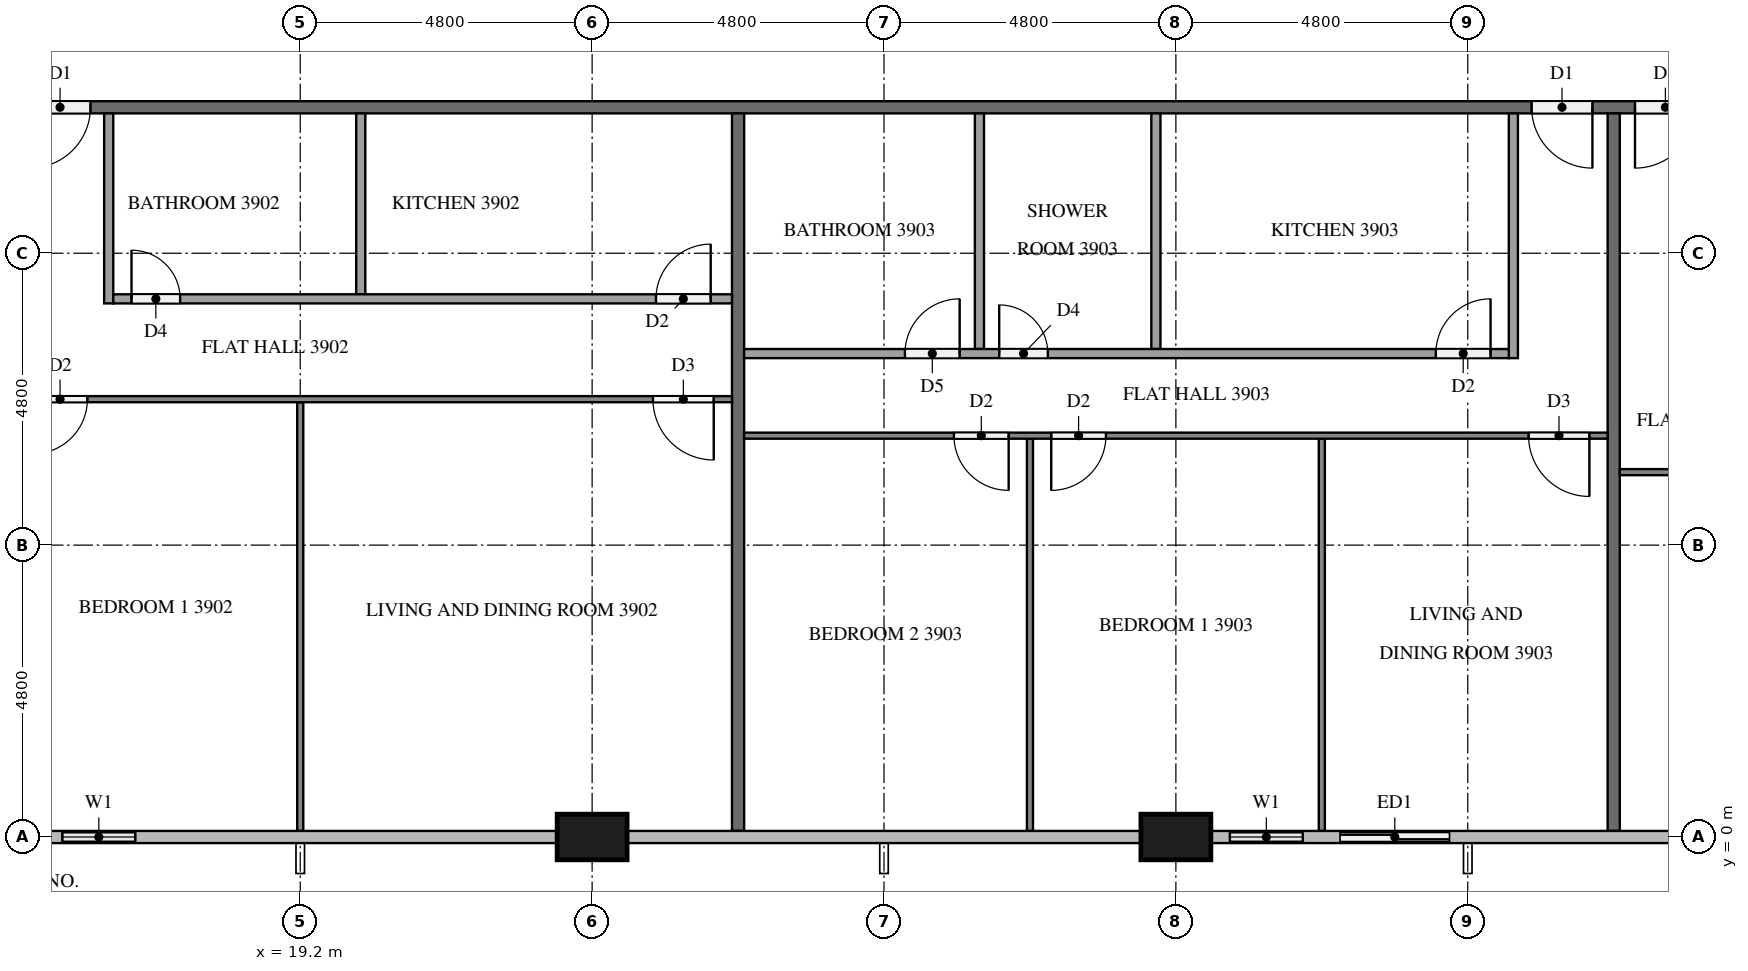
"""IFC4 building model, lengths in metres.
Left out: names, types, materials, properties, quantities, classifications, styles, units other than length and angle.
Written with IfcOpenShell. Run it as: python <this file> out.ifc"""

import sys

from ifc_helpers import new_model, si_unit, direction, frame, frame_2d, origin, origin_2d, place, context, subcontext, project, spatial, rectangle, extrude, element, fill, save


model = new_model("IFC4")
c1 = context("Model", 3, precision=1e-05, world=origin(), true_north=direction((0.0, 1.0)))
c2 = subcontext(c1, "Body", "Model", "MODEL_VIEW")
j1 = project(units=[si_unit("LENGTHUNIT", "METRE"), si_unit("PLANEANGLEUNIT", "RADIAN")], contexts=[c1])
p1 = place(None, origin())
s1 = spatial("IfcSite", under=j1, at=p1, CompositionType="ELEMENT")
p2 = place(p1, origin())
s2 = spatial("IfcBuilding", under=s1, at=p2, CompositionType="ELEMENT")
p3 = place(p2, frame((0.0, 0.0, 152.5)))
s3 = spatial("IfcBuildingStorey", under=s2, at=p3, CompositionType="ELEMENT", Elevation=152.5)
for number, where, z_axis, x_axis in (
    (1, (24.0, 0.0, 0.0), (0.0, 0.0, 1.0), (1.0, 0.0, 0.0)),
    (2, (33.6, 0.0, 0.0), (0.0, 0.0, 1.0), (1.0, 0.0, 0.0)),
):
    element("IfcColumn", number, at=place(p3, frame(where, z_axis=z_axis, x_axis=x_axis)), inside=s3, PredefinedType="COLUMN", context=c2, shape_type="SweptSolid", body=[
        extrude(rectangle(XDim=1.15, YDim=0.75, at=origin_2d()), origin(), (0.0, 0.0, 1.0), 3.2),
    ])
p4 = place(p3, frame((14.975, 0.0, 0.0), z_axis=(0.0, 0.0, 1.0), x_axis=(1.0, 0.0, 0.0)))
e3 = element("IfcWall", 3, at=p4, inside=s3, PredefinedType="SOLIDWALL", context=c2, shape_type="SweptSolid", body=[
    extrude(rectangle(XDim=1.825, YDim=0.15, at=frame_2d((0.913, 0.0))), origin(), (0.0, 0.0, 1.0), 3.2),
])
p5 = place(p4, frame((0.312, 0.0, 0.9)))
e4 = element("IfcOpeningElement", 4, at=p5, cuts=e3, PredefinedType="OPENING", context=c2, shape_type="SweptSolid", body=[
    extrude(rectangle(XDim=1.2, YDim=1.4, at=frame_2d((0.6, 0.7))), frame((0.0, 0.085, 0.0), z_axis=(0.0, -1.0, 0.0), x_axis=(1.0, 0.0, 0.0)), (0.0, 0.0, 1.0), 0.17),
])
p6 = place(p3, frame((34.175, 0.0, 0.0), z_axis=(0.0, 0.0, 1.0), x_axis=(1.0, 0.0, 0.0)))
e5 = element("IfcWall", 5, at=p6, inside=s3, PredefinedType="SOLIDWALL", context=c2, shape_type="SweptSolid", body=[
    extrude(rectangle(XDim=4.225, YDim=0.15, at=frame_2d((2.112, 0.0))), origin(), (0.0, 0.0, 1.0), 3.2),
])
p7 = place(p6, frame((0.312, 0.0, 0.9)))
e6 = element("IfcOpeningElement", 6, at=p7, cuts=e5, PredefinedType="OPENING", context=c2, shape_type="SweptSolid", body=[
    extrude(rectangle(XDim=1.2, YDim=1.4, at=frame_2d((0.6, 0.7))), frame((0.0, 0.085, 0.0), z_axis=(0.0, -1.0, 0.0), x_axis=(1.0, 0.0, 0.0)), (0.0, 0.0, 1.0), 0.17),
])
p8 = place(p6, frame((2.125, 0.0, 0.0)))
e7 = element("IfcOpeningElement", 7, at=p8, cuts=e5, PredefinedType="OPENING", context=c2, shape_type="SweptSolid", body=[
    extrude(rectangle(XDim=1.8, YDim=2.4, at=frame_2d((0.9, 1.2))), frame((0.0, 0.085, 0.0), z_axis=(0.0, -1.0, 0.0), x_axis=(1.0, 0.0, 0.0)), (0.0, 0.0, 1.0), 0.17),
])
p9 = place(p3, frame((50.5, 12.0, 0.0), z_axis=(0.0, 0.0, 1.0), x_axis=(-1.0, 0.0, 0.0)))
e8 = element("IfcWall", 8, at=p9, inside=s3, PredefinedType="PARTITIONING", context=c2, shape_type="SweptSolid", body=[
    extrude(rectangle(XDim=38.6, YDim=0.2, at=frame_2d((19.3, 0.0))), origin(), (0.0, 0.0, 1.0), 3.2),
])
p10 = place(p9, frame((36.45, 0.0, 0.0)))
e9 = element("IfcOpeningElement", 9, at=p10, cuts=e8, PredefinedType="OPENING", context=c2, shape_type="SweptSolid", body=[
    extrude(rectangle(XDim=1.0, YDim=2.1, at=frame_2d((0.5, 1.05))), frame((0.0, 0.11, 0.0), z_axis=(0.0, -1.0, 0.0), x_axis=(1.0, 0.0, 0.0)), (0.0, 0.0, 1.0), 0.22),
])
p11 = place(p9, frame((34.75, 0.0, 0.0)))
e10 = element("IfcOpeningElement", 10, at=p11, cuts=e8, PredefinedType="OPENING", context=c2, shape_type="SweptSolid", body=[
    extrude(rectangle(XDim=1.0, YDim=2.1, at=frame_2d((0.5, 1.05))), frame((0.0, 0.11, 0.0), z_axis=(0.0, -1.0, 0.0), x_axis=(1.0, 0.0, 0.0)), (0.0, 0.0, 1.0), 0.22),
])
p12 = place(p9, frame((10.05, 0.0, 0.0)))
e11 = element("IfcOpeningElement", 11, at=p12, cuts=e8, PredefinedType="OPENING", context=c2, shape_type="SweptSolid", body=[
    extrude(rectangle(XDim=1.0, YDim=2.1, at=frame_2d((0.5, 1.05))), frame((0.0, 0.11, 0.0), z_axis=(0.0, -1.0, 0.0), x_axis=(1.0, 0.0, 0.0)), (0.0, 0.0, 1.0), 0.22),
])
p13 = place(p9, frame((8.35, 0.0, 0.0)))
e12 = element("IfcOpeningElement", 12, at=p13, cuts=e8, PredefinedType="OPENING", context=c2, shape_type="SweptSolid", body=[
    extrude(rectangle(XDim=1.0, YDim=2.1, at=frame_2d((0.5, 1.05))), frame((0.0, 0.11, 0.0), z_axis=(0.0, -1.0, 0.0), x_axis=(1.0, 0.0, 0.0)), (0.0, 0.0, 1.0), 0.22),
])
for number, where, z_axis, x_axis in (
    (13, (26.4, 11.9, 0.0), (0.0, 0.0, 1.0), (0.0, -1.0, 0.0)),
    (14, (40.8, 11.9, 0.0), (0.0, 0.0, 1.0), (0.0, -1.0, 0.0)),
):
    element("IfcWall", number, at=place(p3, frame(where, z_axis=z_axis, x_axis=x_axis)), inside=s3, PredefinedType="PARTITIONING", context=c2, shape_type="SweptSolid", body=[
        extrude(rectangle(XDim=11.8, YDim=0.2, at=frame_2d((5.9, 0.0))), origin(), (0.0, 0.0, 1.0), 3.2),
    ])
p14 = place(p3, frame((19.2, 7.15, 0.0), z_axis=(0.0, 0.0, 1.0), x_axis=(0.0, -1.0, 0.0)))
e15 = element("IfcWall", 15, at=p14, inside=s3, PredefinedType="PARTITIONING", context=c2, shape_type="SweptSolid", body=[
    extrude(rectangle(XDim=7.05, YDim=0.1, at=frame_2d((3.525, 0.0))), origin(), (0.0, 0.0, 1.0), 3.2),
])
p15 = place(p3, frame((26.3, 7.2, 0.0), z_axis=(0.0, 0.0, 1.0), x_axis=(-1.0, 0.0, 0.0)))
e16 = element("IfcWall", 16, at=p15, inside=s3, PredefinedType="PARTITIONING", context=c2, shape_type="SweptSolid", body=[
    extrude(rectangle(XDim=11.8, YDim=0.1, at=frame_2d((5.9, 0.0))), origin(), (0.0, 0.0, 1.0), 3.2),
])
p16 = place(p15, frame((10.6, 0.0, 0.0)))
e17 = element("IfcOpeningElement", 17, at=p16, cuts=e16, PredefinedType="OPENING", context=c2, shape_type="SweptSolid", body=[
    extrude(rectangle(XDim=0.9, YDim=2.1, at=frame_2d((0.45, 1.05))), frame((0.0, 0.06, 0.0), z_axis=(0.0, -1.0, 0.0), x_axis=(1.0, 0.0, 0.0)), (0.0, 0.0, 1.0), 0.12),
])
p17 = place(p15, frame((0.3, 0.0, 0.0)))
e18 = element("IfcOpeningElement", 18, at=p17, cuts=e16, PredefinedType="OPENING", context=c2, shape_type="SweptSolid", body=[
    extrude(rectangle(XDim=1.0, YDim=2.1, at=frame_2d((0.5, 1.05))), frame((0.0, 0.06, 0.0), z_axis=(0.0, -1.0, 0.0), x_axis=(1.0, 0.0, 0.0)), (0.0, 0.0, 1.0), 0.12),
])
p18 = place(p3, frame((20.195, 11.9, 0.0), z_axis=(0.0, 0.0, 1.0), x_axis=(0.0, -1.0, 0.0)))
e19 = element("IfcWall", 19, at=p18, inside=s3, PredefinedType="PARTITIONING", context=c2, shape_type="SweptSolid", body=[
    extrude(rectangle(XDim=2.975, YDim=0.15, at=frame_2d((1.487, 0.0))), origin(), (0.0, 0.0, 1.0), 3.2),
])
p19 = place(p3, frame((16.05, 11.9, 0.0), z_axis=(0.0, 0.0, 1.0), x_axis=(0.0, -1.0, 0.0)))
e20 = element("IfcWall", 20, at=p19, inside=s3, PredefinedType="PARTITIONING", context=c2, shape_type="SweptSolid", body=[
    extrude(rectangle(XDim=3.125, YDim=0.15, at=frame_2d((1.562, 0.0))), origin(), (0.0, 0.0, 1.0), 3.2),
])
p20 = place(p3, frame((16.125, 8.85, 0.0), z_axis=(0.0, 0.0, 1.0), x_axis=(1.0, 0.0, 0.0)))
e21 = element("IfcWall", 21, at=p20, inside=s3, PredefinedType="PARTITIONING", context=c2, shape_type="SweptSolid", body=[
    extrude(rectangle(XDim=10.175, YDim=0.15, at=frame_2d((5.087, 0.0))), origin(), (0.0, 0.0, 1.0), 3.2),
])
p21 = place(p20, frame((0.3, 0.0, 0.0)))
e22 = element("IfcOpeningElement", 22, at=p21, cuts=e21, PredefinedType="OPENING", context=c2, shape_type="SweptSolid", body=[
    extrude(rectangle(XDim=0.8, YDim=2.1, at=frame_2d((0.4, 1.05))), frame((0.0, 0.085, 0.0), z_axis=(0.0, -1.0, 0.0), x_axis=(1.0, 0.0, 0.0)), (0.0, 0.0, 1.0), 0.17),
])
p22 = place(p20, frame((8.925, 0.0, 0.0)))
e23 = element("IfcOpeningElement", 23, at=p22, cuts=e21, PredefinedType="OPENING", context=c2, shape_type="SweptSolid", body=[
    extrude(rectangle(XDim=0.9, YDim=2.1, at=frame_2d((0.45, 1.05))), frame((0.0, 0.085, 0.0), z_axis=(0.0, -1.0, 0.0), x_axis=(1.0, 0.0, 0.0)), (0.0, 0.0, 1.0), 0.17),
])
for number, where, z_axis, x_axis in (
    (24, (36.0, 6.55, 0.0), (0.0, 0.0, 1.0), (0.0, -1.0, 0.0)),
    (25, (31.2, 6.55, 0.0), (0.0, 0.0, 1.0), (0.0, -1.0, 0.0)),
):
    element("IfcWall", number, at=place(p3, frame(where, z_axis=z_axis, x_axis=x_axis)), inside=s3, PredefinedType="PARTITIONING", context=c2, shape_type="SweptSolid", body=[
        extrude(rectangle(XDim=6.45, YDim=0.1, at=frame_2d((3.225, 0.0))), origin(), (0.0, 0.0, 1.0), 3.2),
    ])
p23 = place(p3, frame((40.7, 6.6, 0.0), z_axis=(0.0, 0.0, 1.0), x_axis=(-1.0, 0.0, 0.0)))
e26 = element("IfcWall", 26, at=p23, inside=s3, PredefinedType="PARTITIONING", context=c2, shape_type="SweptSolid", body=[
    extrude(rectangle(XDim=14.2, YDim=0.1, at=frame_2d((7.1, 0.0))), origin(), (0.0, 0.0, 1.0), 3.2),
])
p24 = place(p23, frame((0.3, 0.0, 0.0)))
e27 = element("IfcOpeningElement", 27, at=p24, cuts=e26, PredefinedType="OPENING", context=c2, shape_type="SweptSolid", body=[
    extrude(rectangle(XDim=1.0, YDim=2.1, at=frame_2d((0.5, 1.05))), frame((0.0, 0.06, 0.0), z_axis=(0.0, -1.0, 0.0), x_axis=(1.0, 0.0, 0.0)), (0.0, 0.0, 1.0), 0.12),
])
p25 = place(p23, frame((8.25, 0.0, 0.0)))
e28 = element("IfcOpeningElement", 28, at=p25, cuts=e26, PredefinedType="OPENING", context=c2, shape_type="SweptSolid", body=[
    extrude(rectangle(XDim=0.9, YDim=2.1, at=frame_2d((0.45, 1.05))), frame((0.0, 0.06, 0.0), z_axis=(0.0, -1.0, 0.0), x_axis=(1.0, 0.0, 0.0)), (0.0, 0.0, 1.0), 0.12),
])
p26 = place(p23, frame((9.85, 0.0, 0.0)))
e29 = element("IfcOpeningElement", 29, at=p26, cuts=e26, PredefinedType="OPENING", context=c2, shape_type="SweptSolid", body=[
    extrude(rectangle(XDim=0.9, YDim=2.1, at=frame_2d((0.45, 1.05))), frame((0.0, 0.06, 0.0), z_axis=(0.0, -1.0, 0.0), x_axis=(1.0, 0.0, 0.0)), (0.0, 0.0, 1.0), 0.12),
])
for number, where, z_axis, x_axis in (
    (30, (33.271, 11.9, 0.0), (0.0, 0.0, 1.0), (0.0, -1.0, 0.0)),
    (31, (30.369, 11.9, 0.0), (0.0, 0.0, 1.0), (0.0, -1.0, 0.0)),
):
    element("IfcWall", number, at=place(p3, frame(where, z_axis=z_axis, x_axis=x_axis)), inside=s3, PredefinedType="PARTITIONING", context=c2, shape_type="SweptSolid", body=[
        extrude(rectangle(XDim=3.875, YDim=0.15, at=frame_2d((1.938, 0.0))), origin(), (0.0, 0.0, 1.0), 3.2),
    ])
p27 = place(p3, frame((39.15, 11.9, 0.0), z_axis=(0.0, 0.0, 1.0), x_axis=(0.0, -1.0, 0.0)))
e32 = element("IfcWall", 32, at=p27, inside=s3, PredefinedType="PARTITIONING", context=c2, shape_type="SweptSolid", body=[
    extrude(rectangle(XDim=4.025, YDim=0.15, at=frame_2d((2.012, 0.0))), origin(), (0.0, 0.0, 1.0), 3.2),
])
p28 = place(p3, frame((26.5, 7.95, 0.0), z_axis=(0.0, 0.0, 1.0), x_axis=(1.0, 0.0, 0.0)))
e33 = element("IfcWall", 33, at=p28, inside=s3, PredefinedType="PARTITIONING", context=c2, shape_type="SweptSolid", body=[
    extrude(rectangle(XDim=12.575, YDim=0.15, at=frame_2d((6.288, 0.0))), origin(), (0.0, 0.0, 1.0), 3.2),
])
p29 = place(p28, frame((11.375, 0.0, 0.0)))
e34 = element("IfcOpeningElement", 34, at=p29, cuts=e33, PredefinedType="OPENING", context=c2, shape_type="SweptSolid", body=[
    extrude(rectangle(XDim=0.9, YDim=2.1, at=frame_2d((0.45, 1.05))), frame((0.0, 0.085, 0.0), z_axis=(0.0, -1.0, 0.0), x_axis=(1.0, 0.0, 0.0)), (0.0, 0.0, 1.0), 0.17),
])
p30 = place(p28, frame((4.194, 0.0, 0.0)))
e35 = element("IfcOpeningElement", 35, at=p30, cuts=e33, PredefinedType="OPENING", context=c2, shape_type="SweptSolid", body=[
    extrude(rectangle(XDim=0.8, YDim=2.1, at=frame_2d((0.4, 1.05))), frame((0.0, 0.085, 0.0), z_axis=(0.0, -1.0, 0.0), x_axis=(1.0, 0.0, 0.0)), (0.0, 0.0, 1.0), 0.17),
])
p31 = place(p28, frame((2.644, 0.0, 0.0)))
e36 = element("IfcOpeningElement", 36, at=p31, cuts=e33, PredefinedType="OPENING", context=c2, shape_type="SweptSolid", body=[
    extrude(rectangle(XDim=0.9, YDim=2.1, at=frame_2d((0.45, 1.05))), frame((0.0, 0.085, 0.0), z_axis=(0.0, -1.0, 0.0), x_axis=(1.0, 0.0, 0.0)), (0.0, 0.0, 1.0), 0.17),
])
p32 = place(p3, frame((57.5, 6.0, 0.0), z_axis=(0.0, 0.0, 1.0), x_axis=(-1.0, 0.0, 0.0)))
e37 = element("IfcWall", 37, at=p32, inside=s3, PredefinedType="PARTITIONING", context=c2, shape_type="SweptSolid", body=[
    extrude(rectangle(XDim=16.6, YDim=0.1, at=frame_2d((8.3, 0.0))), origin(), (0.0, 0.0, 1.0), 3.2),
])
p33 = place(p32, frame((9.85, 0.0, 0.0)))
e38 = element("IfcOpeningElement", 38, at=p33, cuts=e37, PredefinedType="OPENING", context=c2, shape_type="SweptSolid", body=[
    extrude(rectangle(XDim=1.0, YDim=2.1, at=frame_2d((0.5, 1.05))), frame((0.0, 0.06, 0.0), z_axis=(0.0, -1.0, 0.0), x_axis=(1.0, 0.0, 0.0)), (0.0, 0.0, 1.0), 0.12),
])
p34 = place(p32, frame((8.25, 0.0, 0.0)))
e39 = element("IfcOpeningElement", 39, at=p34, cuts=e37, PredefinedType="OPENING", context=c2, shape_type="SweptSolid", body=[
    extrude(rectangle(XDim=0.9, YDim=2.1, at=frame_2d((0.45, 1.05))), frame((0.0, 0.06, 0.0), z_axis=(0.0, -1.0, 0.0), x_axis=(1.0, 0.0, 0.0)), (0.0, 0.0, 1.0), 0.12),
])
p35 = place(p32, frame((0.5, 0.0, 0.0)))
e40 = element("IfcOpeningElement", 40, at=p35, cuts=e37, PredefinedType="OPENING", context=c2, shape_type="SweptSolid", body=[
    extrude(rectangle(XDim=0.9, YDim=2.1, at=frame_2d((0.45, 1.05))), frame((0.0, 0.06, 0.0), z_axis=(0.0, -1.0, 0.0), x_axis=(1.0, 0.0, 0.0)), (0.0, 0.0, 1.0), 0.12),
])
p36 = place(p5, origin())
e41 = element("IfcWindow", 41, at=p36, inside=s3, PartitioningType="SINGLE_PANEL", PredefinedType="WINDOW", context=c2, shape_type="SweptSolid", body=[
    extrude(rectangle(XDim=1.2, YDim=1.4, at=frame_2d((0.6, 0.7))), frame((0.0, 0.03, 0.0), z_axis=(0.0, -1.0, 0.0), x_axis=(1.0, 0.0, 0.0)), (0.0, 0.0, 1.0), 0.06),
])
fill(e4, e41)
p37 = place(p7, origin())
e42 = element("IfcWindow", 42, at=p37, inside=s3, PartitioningType="SINGLE_PANEL", PredefinedType="WINDOW", context=c2, shape_type="SweptSolid", body=[
    extrude(rectangle(XDim=1.2, YDim=1.4, at=frame_2d((0.6, 0.7))), frame((0.0, 0.03, 0.0), z_axis=(0.0, -1.0, 0.0), x_axis=(1.0, 0.0, 0.0)), (0.0, 0.0, 1.0), 0.06),
])
fill(e6, e42)
p38 = place(p8, origin())
e43 = element("IfcDoor", 43, at=p38, inside=s3, OperationType="SLIDING_TO_LEFT", PredefinedType="DOOR", context=c2, shape_type="SweptSolid", body=[
    extrude(rectangle(XDim=1.8, YDim=2.4, at=frame_2d((0.9, 1.2))), frame((0.0, 0.025, 0.0), z_axis=(0.0, -1.0, 0.0), x_axis=(1.0, 0.0, 0.0)), (0.0, 0.0, 1.0), 0.05),
])
fill(e7, e43)
p39 = place(p11, origin())
e44 = element("IfcDoor", 44, at=p39, inside=s3, OperationType="SINGLE_SWING_RIGHT", PredefinedType="DOOR", context=c2, shape_type="SweptSolid", body=[
    extrude(rectangle(XDim=1.0, YDim=2.1, at=frame_2d((0.5, 1.05))), frame((0.0, 0.025, 0.0), z_axis=(0.0, -1.0, 0.0), x_axis=(1.0, 0.0, 0.0)), (0.0, 0.0, 1.0), 0.05),
])
fill(e10, e44)
p40 = place(p12, origin())
e45 = element("IfcDoor", 45, at=p40, inside=s3, OperationType="SINGLE_SWING_LEFT", PredefinedType="DOOR", context=c2, shape_type="SweptSolid", body=[
    extrude(rectangle(XDim=1.0, YDim=2.1, at=frame_2d((0.5, 1.05))), frame((0.0, 0.025, 0.0), z_axis=(0.0, -1.0, 0.0), x_axis=(1.0, 0.0, 0.0)), (0.0, 0.0, 1.0), 0.05),
])
fill(e11, e45)
p41 = place(p13, origin())
e46 = element("IfcDoor", 46, at=p41, inside=s3, OperationType="SINGLE_SWING_RIGHT", PredefinedType="DOOR", context=c2, shape_type="SweptSolid", body=[
    extrude(rectangle(XDim=1.0, YDim=2.1, at=frame_2d((0.5, 1.05))), frame((0.0, 0.025, 0.0), z_axis=(0.0, -1.0, 0.0), x_axis=(1.0, 0.0, 0.0)), (0.0, 0.0, 1.0), 0.05),
])
fill(e12, e46)
p42 = place(p16, origin())
e47 = element("IfcDoor", 47, at=p42, inside=s3, OperationType="SINGLE_SWING_RIGHT", PredefinedType="DOOR", context=c2, shape_type="SweptSolid", body=[
    extrude(rectangle(XDim=0.9, YDim=2.1, at=frame_2d((0.45, 1.05))), frame((0.0, 0.025, 0.0), z_axis=(0.0, -1.0, 0.0), x_axis=(1.0, 0.0, 0.0)), (0.0, 0.0, 1.0), 0.05),
])
fill(e17, e47)
p43 = place(p17, origin())
e48 = element("IfcDoor", 48, at=p43, inside=s3, OperationType="SINGLE_SWING_LEFT", PredefinedType="DOOR", context=c2, shape_type="SweptSolid", body=[
    extrude(rectangle(XDim=1.0, YDim=2.1, at=frame_2d((0.5, 1.05))), frame((0.0, 0.025, 0.0), z_axis=(0.0, -1.0, 0.0), x_axis=(1.0, 0.0, 0.0)), (0.0, 0.0, 1.0), 0.05),
])
fill(e18, e48)
p44 = place(p21, origin())
e49 = element("IfcDoor", 49, at=p44, inside=s3, OperationType="SINGLE_SWING_LEFT", PredefinedType="DOOR", context=c2, shape_type="SweptSolid", body=[
    extrude(rectangle(XDim=0.8, YDim=2.1, at=frame_2d((0.4, 1.05))), frame((0.0, 0.025, 0.0), z_axis=(0.0, -1.0, 0.0), x_axis=(1.0, 0.0, 0.0)), (0.0, 0.0, 1.0), 0.05),
])
fill(e22, e49)
p45 = place(p22, origin())
e50 = element("IfcDoor", 50, at=p45, inside=s3, OperationType="SINGLE_SWING_RIGHT", PredefinedType="DOOR", context=c2, shape_type="SweptSolid", body=[
    extrude(rectangle(XDim=0.9, YDim=2.1, at=frame_2d((0.45, 1.05))), frame((0.0, 0.025, 0.0), z_axis=(0.0, -1.0, 0.0), x_axis=(1.0, 0.0, 0.0)), (0.0, 0.0, 1.0), 0.05),
])
fill(e23, e50)
p46 = place(p24, origin())
e51 = element("IfcDoor", 51, at=p46, inside=s3, OperationType="SINGLE_SWING_LEFT", PredefinedType="DOOR", context=c2, shape_type="SweptSolid", body=[
    extrude(rectangle(XDim=1.0, YDim=2.1, at=frame_2d((0.5, 1.05))), frame((0.0, 0.025, 0.0), z_axis=(0.0, -1.0, 0.0), x_axis=(1.0, 0.0, 0.0)), (0.0, 0.0, 1.0), 0.05),
])
fill(e27, e51)
p47 = place(p25, origin())
e52 = element("IfcDoor", 52, at=p47, inside=s3, OperationType="SINGLE_SWING_RIGHT", PredefinedType="DOOR", context=c2, shape_type="SweptSolid", body=[
    extrude(rectangle(XDim=0.9, YDim=2.1, at=frame_2d((0.45, 1.05))), frame((0.0, 0.025, 0.0), z_axis=(0.0, -1.0, 0.0), x_axis=(1.0, 0.0, 0.0)), (0.0, 0.0, 1.0), 0.05),
])
fill(e28, e52)
p48 = place(p26, origin())
e53 = element("IfcDoor", 53, at=p48, inside=s3, OperationType="SINGLE_SWING_LEFT", PredefinedType="DOOR", context=c2, shape_type="SweptSolid", body=[
    extrude(rectangle(XDim=0.9, YDim=2.1, at=frame_2d((0.45, 1.05))), frame((0.0, 0.025, 0.0), z_axis=(0.0, -1.0, 0.0), x_axis=(1.0, 0.0, 0.0)), (0.0, 0.0, 1.0), 0.05),
])
fill(e29, e53)
p49 = place(p29, origin())
e54 = element("IfcDoor", 54, at=p49, inside=s3, OperationType="SINGLE_SWING_RIGHT", PredefinedType="DOOR", context=c2, shape_type="SweptSolid", body=[
    extrude(rectangle(XDim=0.9, YDim=2.1, at=frame_2d((0.45, 1.05))), frame((0.0, 0.025, 0.0), z_axis=(0.0, -1.0, 0.0), x_axis=(1.0, 0.0, 0.0)), (0.0, 0.0, 1.0), 0.05),
])
fill(e34, e54)
p50 = place(p30, origin())
e55 = element("IfcDoor", 55, at=p50, inside=s3, OperationType="SINGLE_SWING_LEFT", PredefinedType="DOOR", context=c2, shape_type="SweptSolid", body=[
    extrude(rectangle(XDim=0.8, YDim=2.1, at=frame_2d((0.4, 1.05))), frame((0.0, 0.025, 0.0), z_axis=(0.0, -1.0, 0.0), x_axis=(1.0, 0.0, 0.0)), (0.0, 0.0, 1.0), 0.05),
])
fill(e35, e55)
p51 = place(p31, origin())
e56 = element("IfcDoor", 56, at=p51, inside=s3, OperationType="SINGLE_SWING_RIGHT", PredefinedType="DOOR", context=c2, shape_type="SweptSolid", body=[
    extrude(rectangle(XDim=0.9, YDim=2.1, at=frame_2d((0.45, 1.05))), frame((0.0, 0.025, 0.0), z_axis=(0.0, -1.0, 0.0), x_axis=(1.0, 0.0, 0.0)), (0.0, 0.0, 1.0), 0.05),
])
fill(e36, e56)
save(model, sys.argv[1])
